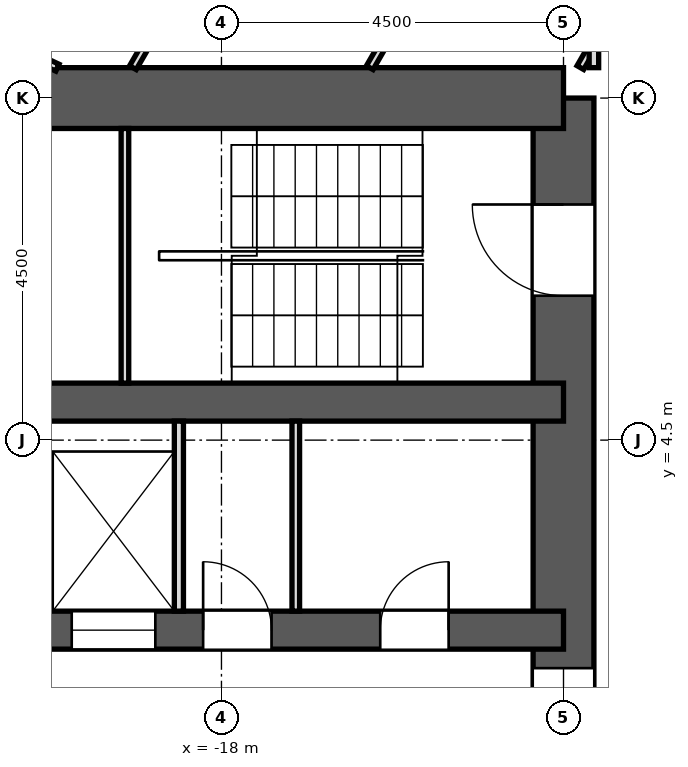
"""IFC4 building model, lengths in metres.
Left out: names, types, materials, properties, quantities, classifications, styles, units other than length and angle.
Written with IfcOpenShell. Run it as: python <this file> out.ifc"""

import sys

from ifc_helpers import new_model, si_unit, direction, frame, frame_2d, origin, place, context, subcontext, project, spatial, rectangle, extrude, element, fill, save


model = new_model("IFC4")
c1 = context("Model", 3, precision=1e-05, world=origin(), true_north=direction((0.0, 1.0)))
c2 = subcontext(c1, "Body", "Model", "MODEL_VIEW")
j1 = project(units=[si_unit("LENGTHUNIT", "METRE"), si_unit("PLANEANGLEUNIT", "RADIAN")], contexts=[c1])
p1 = place(None, origin())
s1 = spatial("IfcSite", under=j1, at=p1, CompositionType="ELEMENT")
p2 = place(p1, origin())
s2 = spatial("IfcBuilding", under=s1, at=p2, CompositionType="ELEMENT")
p3 = place(p2, frame((0.0, 0.0, 111.7)))
s3 = spatial("IfcBuildingStorey", under=s2, at=p3, CompositionType="ELEMENT", Elevation=111.7)
p4 = place(p3, frame((-13.5, -9.0, 0.0), z_axis=(0.0, 0.0, 1.0), x_axis=(0.0, 1.0, 0.0)))
e1 = element("IfcWall", 1, at=p4, inside=s3, PredefinedType="SHEAR", context=c2, shape_type="SweptSolid", body=[
    extrude(rectangle(XDim=18.0, YDim=0.8, at=frame_2d((9.0, 0.0))), origin(), (0.0, 0.0, 1.0), 3.3),
])
p5 = place(p4, frame((15.4, 0.0, 0.0)))
e2 = element("IfcOpeningElement", 2, at=p5, cuts=e1, PredefinedType="OPENING", context=c2, shape_type="SweptSolid", body=[
    extrude(rectangle(XDim=1.2, YDim=2.1, at=frame_2d((0.6, 1.05))), frame((0.0, 0.412, 0.0), z_axis=(0.0, -1.0, 0.0), x_axis=(1.0, 0.0, 0.0)), (0.0, 0.0, 1.0), 0.824),
])
p6 = place(p4, frame((1.4, 0.0, 0.0)))
e3 = element("IfcOpeningElement", 3, at=p6, cuts=e1, PredefinedType="OPENING", context=c2, shape_type="SweptSolid", body=[
    extrude(rectangle(XDim=1.2, YDim=2.1, at=frame_2d((0.6, 1.05))), frame((0.0, 0.412, 0.0), z_axis=(0.0, -1.0, 0.0), x_axis=(1.0, 0.0, 0.0)), (0.0, 0.0, 1.0), 0.824),
])
p7 = place(p4, frame((7.5, 0.0, 0.0)))
e4 = element("IfcOpeningElement", 4, at=p7, cuts=e1, PredefinedType="OPENING", context=c2, shape_type="SweptSolid", body=[
    extrude(rectangle(XDim=3.0, YDim=2.4, at=frame_2d((1.5, 1.2))), frame((0.0, 0.412, 0.0), z_axis=(0.0, -1.0, 0.0), x_axis=(1.0, 0.0, 0.0)), (0.0, 0.0, 1.0), 0.824),
])
p8 = place(p3, frame((-13.5, 9.0, 0.0), z_axis=(0.0, 0.0, 1.0), x_axis=(-1.0, 0.0, 0.0)))
e5 = element("IfcWall", 5, at=p8, inside=s3, PredefinedType="SHEAR", context=c2, shape_type="SweptSolid", body=[
    extrude(rectangle(XDim=10.4, YDim=0.8, at=frame_2d((5.2, 0.0))), origin(), (0.0, 0.0, 1.0), 3.3),
])
p9 = place(p3, frame((-13.5, 5.0, 0.0), z_axis=(0.0, 0.0, 1.0), x_axis=(-1.0, 0.0, 0.0)))
e6 = element("IfcWall", 6, at=p9, inside=s3, PredefinedType="SHEAR", context=c2, shape_type="SweptSolid", body=[
    extrude(rectangle(XDim=10.4, YDim=0.5, at=frame_2d((5.2, 0.0))), origin(), (0.0, 0.0, 1.0), 3.3),
])
p10 = place(p9, frame((7.489, 0.0, 0.0)))
e7 = element("IfcOpeningElement", 7, at=p10, cuts=e6, PredefinedType="OPENING", context=c2, shape_type="SweptSolid", body=[
    extrude(rectangle(XDim=0.9, YDim=2.1, at=frame_2d((0.45, 1.05))), frame((0.0, 0.262, 0.0), z_axis=(0.0, -1.0, 0.0), x_axis=(1.0, 0.0, 0.0)), (0.0, 0.0, 1.0), 0.524),
])
p11 = place(p3, frame((-13.5, 2.0, 0.0), z_axis=(0.0, 0.0, 1.0), x_axis=(-1.0, 0.0, 0.0)))
e8 = element("IfcWall", 8, at=p11, inside=s3, PredefinedType="SHEAR", context=c2, shape_type="SweptSolid", body=[
    extrude(rectangle(XDim=10.4, YDim=0.5, at=frame_2d((5.2, 0.0))), origin(), (0.0, 0.0, 1.0), 3.3),
])
p12 = place(p11, frame((5.37, 0.0, 0.0)))
e9 = element("IfcOpeningElement", 9, at=p12, cuts=e8, PredefinedType="OPENING", context=c2, shape_type="SweptSolid", body=[
    extrude(rectangle(XDim=1.1, YDim=2.1, at=frame_2d((0.55, 1.05))), frame((0.0, 0.262, 0.0), z_axis=(0.0, -1.0, 0.0), x_axis=(1.0, 0.0, 0.0)), (0.0, 0.0, 1.0), 0.524),
])
p13 = place(p11, frame((1.511, 0.0, 0.0)))
e10 = element("IfcOpeningElement", 10, at=p13, cuts=e8, PredefinedType="OPENING", context=c2, shape_type="SweptSolid", body=[
    extrude(rectangle(XDim=0.9, YDim=2.1, at=frame_2d((0.45, 1.05))), frame((0.0, 0.262, 0.0), z_axis=(0.0, -1.0, 0.0), x_axis=(1.0, 0.0, 0.0)), (0.0, 0.0, 1.0), 0.524),
])
p14 = place(p11, frame((3.841, 0.0, 0.0)))
e11 = element("IfcOpeningElement", 11, at=p14, cuts=e8, PredefinedType="OPENING", context=c2, shape_type="SweptSolid", body=[
    extrude(rectangle(XDim=0.9, YDim=2.1, at=frame_2d((0.45, 1.05))), frame((0.0, 0.262, 0.0), z_axis=(0.0, -1.0, 0.0), x_axis=(1.0, 0.0, 0.0)), (0.0, 0.0, 1.0), 0.524),
])
p15 = place(p11, frame((7.754, 0.0, 0.0)))
e12 = element("IfcOpeningElement", 12, at=p15, cuts=e8, PredefinedType="OPENING", context=c2, shape_type="SweptSolid", body=[
    extrude(rectangle(XDim=0.9, YDim=2.1, at=frame_2d((0.45, 1.05))), frame((0.0, 0.262, 0.0), z_axis=(0.0, -1.0, 0.0), x_axis=(1.0, 0.0, 0.0)), (0.0, 0.0, 1.0), 0.524),
])
p16 = place(p11, frame((9.084, 0.0, 0.0)))
e13 = element("IfcOpeningElement", 13, at=p16, cuts=e8, PredefinedType="OPENING", context=c2, shape_type="SweptSolid", body=[
    extrude(rectangle(XDim=0.9, YDim=2.1, at=frame_2d((0.45, 1.05))), frame((0.0, 0.262, 0.0), z_axis=(0.0, -1.0, 0.0), x_axis=(1.0, 0.0, 0.0)), (0.0, 0.0, 1.0), 0.524),
])
p17 = place(p3, frame((-13.167, 13.167, 0.0), z_axis=(0.0, 0.0, 1.0), x_axis=(0.707106781187, -0.707106781187, 0.0)))
e14 = element("IfcWall", 14, at=p17, inside=s3, PredefinedType="PARTITIONING", context=c2, shape_type="SweptSolid", body=[
    extrude(rectangle(XDim=7.716, YDim=0.125, at=frame_2d((3.858, 0.0))), origin(), (0.0, 0.0, 1.0), 2.8),
])
p18 = place(p3, frame((-23.26, 10.847, 0.0), z_axis=(0.0, 0.0, 1.0), x_axis=(0.906263293643, -0.422713665021, 0.0)))
e15 = element("IfcWall", 15, at=p18, inside=s3, PredefinedType="PARTITIONING", context=c2, shape_type="SweptSolid", body=[
    extrude(rectangle(XDim=3.423, YDim=0.1, at=frame_2d((1.711, 0.0))), origin(), (0.0, 0.0, 1.0), 2.8),
])
p19 = place(p3, frame((-16.049, 9.4, 0.0), z_axis=(0.0, 0.0, 1.0), x_axis=(0.499553700297, 0.866282921752, 0.0)))
e16 = element("IfcWall", 16, at=p19, inside=s3, PredefinedType="PARTITIONING", context=c2, shape_type="SweptSolid", body=[
    extrude(rectangle(XDim=1.461, YDim=0.1, at=frame_2d((0.73, 0.0))), origin(), (0.0, 0.0, 1.0), 2.8),
])
p20 = place(p3, frame((-19.165, 9.4, 0.0), z_axis=(0.0, 0.0, 1.0), x_axis=(0.500214230422, 0.865901682458, 0.0)))
e17 = element("IfcWall", 17, at=p20, inside=s3, PredefinedType="PARTITIONING", context=c2, shape_type="SweptSolid", body=[
    extrude(rectangle(XDim=1.733, YDim=0.1, at=frame_2d((0.867, 0.0))), origin(), (0.0, 0.0, 1.0), 2.8),
])
p21 = place(p3, frame((-13.278, 9.401, 0.0), z_axis=(0.0, 0.0, 1.0), x_axis=(0.49953088146, 0.866296080141, 0.0)))
e18 = element("IfcWall", 18, at=p21, inside=s3, PredefinedType="PARTITIONING", context=c2, shape_type="SweptSolid", body=[
    extrude(rectangle(XDim=0.294, YDim=0.1, at=frame_2d((0.147, 0.0))), origin(), (0.0, 0.0, 1.0), 2.8),
])
p22 = place(p3, frame((-13.1, 9.4, 0.0), z_axis=(0.0, 0.0, 1.0), x_axis=(0.0, 1.0, 0.0)))
e19 = element("IfcWall", 19, at=p22, inside=s3, PredefinedType="PARTITIONING", context=c2, shape_type="SweptSolid", body=[
    extrude(rectangle(XDim=3.633, YDim=0.125, at=frame_2d((1.816, 0.0))), origin(), (0.0, 0.0, 1.0), 2.8),
])
p23 = place(p22, frame((1.302, 0.0, 0.0)))
e20 = element("IfcOpeningElement", 20, at=p23, cuts=e19, PredefinedType="OPENING", context=c2, shape_type="SweptSolid", body=[
    extrude(rectangle(XDim=1.0, YDim=2.1, at=frame_2d((0.5, 1.05))), frame((0.0, 0.074, 0.0), z_axis=(0.0, -1.0, 0.0), x_axis=(1.0, 0.0, 0.0)), (0.0, 0.0, 1.0), 0.149),
])
p24 = place(p3, frame((-17.022, 2.25, 0.0), z_axis=(0.0, 0.0, 1.0), x_axis=(0.0, 1.0, 0.0)))
e21 = element("IfcWall", 21, at=p24, inside=s3, PredefinedType="PARTITIONING", context=c2, shape_type="SweptSolid", body=[
    extrude(rectangle(XDim=2.5, YDim=0.1, at=frame_2d((1.25, 0.0))), origin(), (0.0, 0.0, 1.0), 2.8),
])
p25 = place(p3, frame((-18.56, 2.25, 0.0), z_axis=(0.0, 0.0, 1.0), x_axis=(0.0, 1.0, 0.0)))
e22 = element("IfcWall", 22, at=p25, inside=s3, PredefinedType="PARTITIONING", context=c2, shape_type="SweptSolid", body=[
    extrude(rectangle(XDim=2.5, YDim=0.12, at=frame_2d((1.25, 0.0))), origin(), (0.0, 0.0, 1.0), 2.8),
])
p26 = place(p3, frame((-19.27, 5.25, 0.0), z_axis=(0.0, 0.0, 1.0), x_axis=(0.0, 1.0, 0.0)))
e23 = element("IfcWall", 23, at=p26, inside=s3, PredefinedType="PARTITIONING", context=c2, shape_type="SweptSolid", body=[
    extrude(rectangle(XDim=3.35, YDim=0.1, at=frame_2d((1.675, 0.0))), origin(), (0.0, 0.0, 1.0), 2.8),
])
p27 = place(p12, origin())
e24 = element("IfcDoor", 24, at=p27, inside=s3, OperationType="DOUBLE_DOOR_SLIDING", PredefinedType="DOOR", context=c2, shape_type="SweptSolid", body=[
    extrude(rectangle(XDim=1.1, YDim=2.1, at=frame_2d((0.55, 1.05))), frame((0.0, 0.025, 0.0), z_axis=(0.0, -1.0, 0.0), x_axis=(1.0, 0.0, 0.0)), (0.0, 0.0, 1.0), 0.05),
])
fill(e9, e24)
p28 = place(p13, frame((0.9, 0.0, 0.0), z_axis=(0.0, 0.0, 1.0), x_axis=(-1.0, 0.0, 0.0)))
e25 = element("IfcDoor", 25, at=p28, inside=s3, OperationType="SINGLE_SWING_RIGHT", PredefinedType="DOOR", context=c2, shape_type="SweptSolid", body=[
    extrude(rectangle(XDim=0.9, YDim=2.1, at=frame_2d((0.45, 1.05))), frame((0.0, 0.025, 0.0), z_axis=(0.0, -1.0, 0.0), x_axis=(1.0, 0.0, 0.0)), (0.0, 0.0, 1.0), 0.05),
])
fill(e10, e25)
p29 = place(p14, frame((0.9, 0.0, 0.0), z_axis=(0.0, 0.0, 1.0), x_axis=(-1.0, 0.0, 0.0)))
e26 = element("IfcDoor", 26, at=p29, inside=s3, OperationType="SINGLE_SWING_LEFT", PredefinedType="DOOR", context=c2, shape_type="SweptSolid", body=[
    extrude(rectangle(XDim=0.9, YDim=2.1, at=frame_2d((0.45, 1.05))), frame((0.0, 0.025, 0.0), z_axis=(0.0, -1.0, 0.0), x_axis=(1.0, 0.0, 0.0)), (0.0, 0.0, 1.0), 0.05),
])
fill(e11, e26)
p30 = place(p5, origin())
e27 = element("IfcDoor", 27, at=p30, inside=s3, OperationType="SINGLE_SWING_RIGHT", PredefinedType="DOOR", context=c2, shape_type="SweptSolid", body=[
    extrude(rectangle(XDim=1.2, YDim=2.1, at=frame_2d((0.6, 1.05))), frame((0.0, 0.025, 0.0), z_axis=(0.0, -1.0, 0.0), x_axis=(1.0, 0.0, 0.0)), (0.0, 0.0, 1.0), 0.05),
])
fill(e2, e27)
p31 = place(p7, origin())
e28 = element("IfcDoor", 28, at=p31, inside=s3, OperationType="DOUBLE_DOOR_SLIDING", PredefinedType="DOOR", context=c2, shape_type="SweptSolid", body=[
    extrude(rectangle(XDim=3.0, YDim=2.4, at=frame_2d((1.5, 1.2))), frame((0.0, 0.025, 0.0), z_axis=(0.0, -1.0, 0.0), x_axis=(1.0, 0.0, 0.0)), (0.0, 0.0, 1.0), 0.05),
])
fill(e4, e28)
save(model, sys.argv[1])
